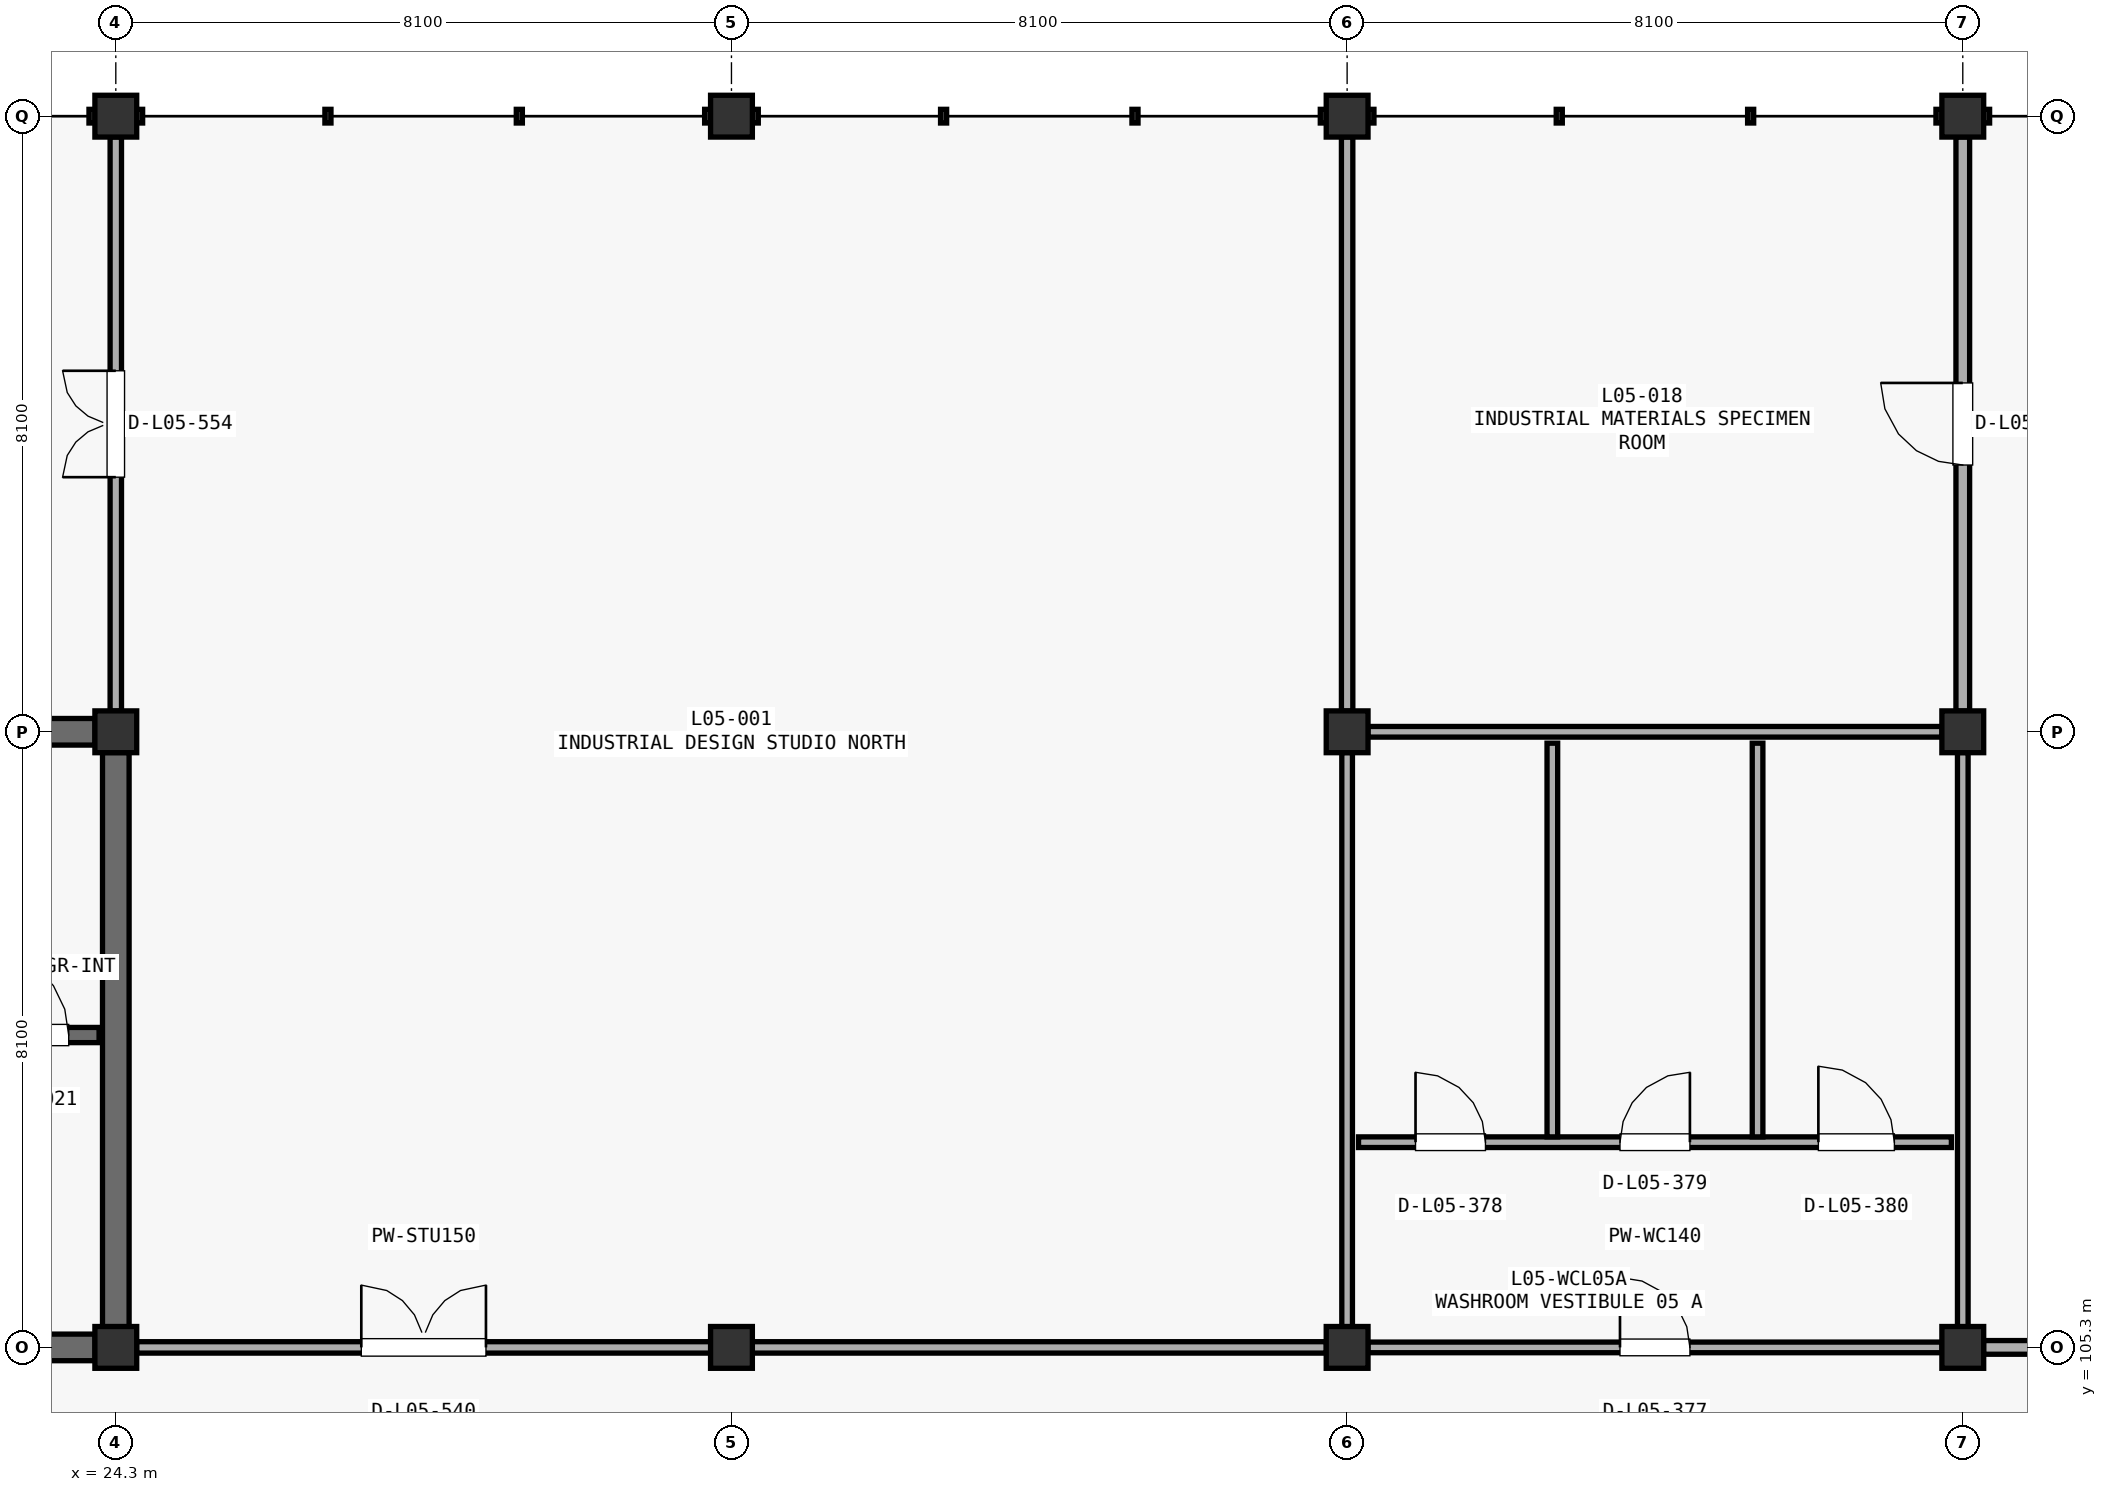
"""IFC4 building model, lengths in metres.
Left out: names, types, materials, properties, quantities, classifications, styles, units other than length and angle.
Written with IfcOpenShell. Run it as: python <this file> out.ifc"""

import sys

from ifc_helpers import new_model, si_unit, direction, frame, frame_2d, origin, origin_2d, place, context, subcontext, project, spatial, rectangle, extrude, element, fill, save


model = new_model("IFC4")
c1 = context("Model", 3, precision=1e-05, world=origin(), true_north=direction((0.0, 1.0)))
c2 = subcontext(c1, "Body", "Model", "MODEL_VIEW")
j1 = project(units=[si_unit("LENGTHUNIT", "METRE"), si_unit("PLANEANGLEUNIT", "RADIAN")], contexts=[c1])
p1 = place(None, origin())
s1 = spatial("IfcSite", under=j1, at=p1, CompositionType="ELEMENT")
p2 = place(p1, origin())
s2 = spatial("IfcBuilding", under=s1, at=p2, CompositionType="ELEMENT")
p3 = place(p2, frame((0.0, 0.0, 22.95)))
s3 = spatial("IfcBuildingStorey", under=s2, at=p3, CompositionType="ELEMENT", Elevation=22.95)
for number, where, z_axis, x_axis in (
    (1, (24.3, 105.3, 0.0), (0.0, 0.0, 1.0), (1.0, 0.0, 0.0)),
    (2, (24.3, 113.4, 0.0), (0.0, 0.0, 1.0), (1.0, 0.0, 0.0)),
    (3, (24.3, 121.5, 0.0), (0.0, 0.0, 1.0), (1.0, 0.0, 0.0)),
    (4, (32.4, 105.3, 0.0), (0.0, 0.0, 1.0), (1.0, 0.0, 0.0)),
    (5, (32.4, 113.4, 0.0), (0.0, 0.0, 1.0), (1.0, 0.0, 0.0)),
    (6, (32.4, 121.5, 0.0), (0.0, 0.0, 1.0), (1.0, 0.0, 0.0)),
    (7, (40.5, 105.3, 0.0), (0.0, 0.0, 1.0), (1.0, 0.0, 0.0)),
    (8, (40.5, 113.4, 0.0), (0.0, 0.0, 1.0), (1.0, 0.0, 0.0)),
    (9, (40.5, 121.5, 0.0), (0.0, 0.0, 1.0), (1.0, 0.0, 0.0)),
    (10, (48.6, 105.3, 0.0), (0.0, 0.0, 1.0), (1.0, 0.0, 0.0)),
    (11, (48.6, 113.4, 0.0), (0.0, 0.0, 1.0), (1.0, 0.0, 0.0)),
    (12, (48.6, 121.5, 0.0), (0.0, 0.0, 1.0), (1.0, 0.0, 0.0)),
):
    element("IfcColumn", number, at=place(p3, frame(where, z_axis=z_axis, x_axis=x_axis)), inside=s3, PredefinedType="COLUMN", context=c2, shape_type="SweptSolid", body=[
        extrude(rectangle(XDim=0.55, YDim=0.55, at=origin_2d()), origin(), (0.0, 0.0, 1.0), 4.42),
    ])
p4 = place(p3, frame((16.473, 113.4, 0.0), z_axis=(0.0, 0.0, 1.0), x_axis=(1.0, 0.0, 0.0)))
e13 = element("IfcWall", 13, at=p4, inside=s3, PredefinedType="SHEAR", context=c2, shape_type="SweptSolid", body=[
    extrude(rectangle(XDim=7.554, YDim=0.35, at=frame_2d((3.777, 0.0))), origin(), (0.0, 0.0, 1.0), 4.162),
])
p5 = place(p3, frame((24.3, 105.573, 0.0), z_axis=(0.0, 0.0, 1.0), x_axis=(0.0, 1.0, 0.0)))
e14 = element("IfcWall", 14, at=p5, inside=s3, PredefinedType="SHEAR", context=c2, shape_type="SweptSolid", body=[
    extrude(rectangle(XDim=7.554, YDim=0.35, at=frame_2d((3.777, 0.0))), origin(), (0.0, 0.0, 1.0), 4.162),
])
p6 = place(p3, frame((16.473, 105.3, 0.0), z_axis=(0.0, 0.0, 1.0), x_axis=(1.0, 0.0, 0.0)))
e15 = element("IfcWall", 15, at=p6, inside=s3, PredefinedType="SHEAR", context=c2, shape_type="SweptSolid", body=[
    extrude(rectangle(XDim=7.554, YDim=0.35, at=frame_2d((3.777, 0.0))), origin(), (0.0, 0.0, 1.0), 4.162),
])
p7 = place(p6, frame((5.304, 0.0, 0.0)))
e16 = element("IfcOpeningElement", 16, at=p7, cuts=e15, PredefinedType="OPENING", context=c2, shape_type="SweptSolid", body=[
    extrude(rectangle(XDim=1.2, YDim=2.2, at=frame_2d((0.6, 1.1))), frame((0.0, 0.185, 0.0), z_axis=(0.0, -1.0, 0.0), x_axis=(1.0, 0.0, 0.0)), (0.0, 0.0, 1.0), 0.37),
])
p8 = place(p3, frame((16.42, 109.41, 0.0), z_axis=(0.0, 0.0, 1.0), x_axis=(1.0, 0.0, 0.0)))
e17 = element("IfcWall", 17, at=p8, inside=s3, PredefinedType="SHEAR", context=c2, shape_type="SweptSolid", body=[
    extrude(rectangle(XDim=7.66, YDim=0.2, at=frame_2d((3.83, 0.0))), origin(), (0.0, 0.0, 1.0), 4.162),
])
p9 = place(p8, frame((6.11, 0.0, 0.0)))
e18 = element("IfcOpeningElement", 18, at=p9, cuts=e17, PredefinedType="OPENING", context=c2, shape_type="SweptSolid", body=[
    extrude(rectangle(XDim=1.15, YDim=2.2, at=frame_2d((0.575, 1.1))), frame((0.0, 0.11, 0.0), z_axis=(0.0, -1.0, 0.0), x_axis=(1.0, 0.0, 0.0)), (0.0, 0.0, 1.0), 0.22),
])
p10 = place(p3, frame((40.773, 105.3, 0.0), z_axis=(0.0, 0.0, 1.0), x_axis=(1.0, 0.0, 0.0)))
e19 = element("IfcWall", 19, at=p10, inside=s3, PredefinedType="PARTITIONING", context=c2, shape_type="SweptSolid", body=[
    extrude(rectangle(XDim=7.554, YDim=0.14, at=frame_2d((3.777, 0.0))), origin(), (0.0, 0.0, 1.0), 3.21),
])
p11 = place(p10, frame((3.317, 0.0, 0.0)))
e20 = element("IfcOpeningElement", 20, at=p11, cuts=e19, PredefinedType="OPENING", context=c2, shape_type="SweptSolid", body=[
    extrude(rectangle(XDim=0.92, YDim=2.15, at=frame_2d((0.46, 1.075))), frame((0.0, 0.08, 0.0), z_axis=(0.0, -1.0, 0.0), x_axis=(1.0, 0.0, 0.0)), (0.0, 0.0, 1.0), 0.16),
])
p12 = place(p3, frame((40.773, 113.4, 0.0), z_axis=(0.0, 0.0, 1.0), x_axis=(1.0, 0.0, 0.0)))
e21 = element("IfcWall", 21, at=p12, inside=s3, PredefinedType="PARTITIONING", context=c2, shape_type="SweptSolid", body=[
    extrude(rectangle(XDim=7.554, YDim=0.14, at=frame_2d((3.777, 0.0))), origin(), (0.0, 0.0, 1.0), 3.41),
])
p13 = place(p3, frame((40.5, 105.573, 0.0), z_axis=(0.0, 0.0, 1.0), x_axis=(0.0, 1.0, 0.0)))
e22 = element("IfcWall", 22, at=p13, inside=s3, PredefinedType="PARTITIONING", context=c2, shape_type="SweptSolid", body=[
    extrude(rectangle(XDim=7.554, YDim=0.14, at=frame_2d((3.777, 0.0))), origin(), (0.0, 0.0, 1.0), 3.21),
])
p14 = place(p3, frame((48.6, 105.573, 0.0), z_axis=(0.0, 0.0, 1.0), x_axis=(0.0, 1.0, 0.0)))
e23 = element("IfcWall", 23, at=p14, inside=s3, PredefinedType="PARTITIONING", context=c2, shape_type="SweptSolid", body=[
    extrude(rectangle(XDim=7.554, YDim=0.14, at=frame_2d((3.777, 0.0))), origin(), (0.0, 0.0, 1.0), 3.51),
])
p15 = place(p3, frame((40.65, 108.0, 0.0), z_axis=(0.0, 0.0, 1.0), x_axis=(1.0, 0.0, 0.0)))
e24 = element("IfcWall", 24, at=p15, inside=s3, PredefinedType="PARTITIONING", context=c2, shape_type="SweptSolid", body=[
    extrude(rectangle(XDim=7.8, YDim=0.14, at=frame_2d((3.9, 0.0))), origin(), (0.0, 0.0, 1.0), 4.162),
])
p16 = place(p15, frame((0.75, 0.0, 0.0)))
e25 = element("IfcOpeningElement", 25, at=p16, cuts=e24, PredefinedType="OPENING", context=c2, shape_type="SweptSolid", body=[
    extrude(rectangle(XDim=0.92, YDim=2.15, at=frame_2d((0.46, 1.075))), frame((0.0, 0.08, 0.0), z_axis=(0.0, -1.0, 0.0), x_axis=(1.0, 0.0, 0.0)), (0.0, 0.0, 1.0), 0.16),
])
p17 = place(p15, frame((3.44, 0.0, 0.0)))
e26 = element("IfcOpeningElement", 26, at=p17, cuts=e24, PredefinedType="OPENING", context=c2, shape_type="SweptSolid", body=[
    extrude(rectangle(XDim=0.92, YDim=2.15, at=frame_2d((0.46, 1.075))), frame((0.0, 0.08, 0.0), z_axis=(0.0, -1.0, 0.0), x_axis=(1.0, 0.0, 0.0)), (0.0, 0.0, 1.0), 0.16),
])
p18 = place(p15, frame((6.05, 0.0, 0.0)))
e27 = element("IfcOpeningElement", 27, at=p18, cuts=e24, PredefinedType="OPENING", context=c2, shape_type="SweptSolid", body=[
    extrude(rectangle(XDim=1.0, YDim=2.15, at=frame_2d((0.5, 1.075))), frame((0.0, 0.08, 0.0), z_axis=(0.0, -1.0, 0.0), x_axis=(1.0, 0.0, 0.0)), (0.0, 0.0, 1.0), 0.16),
])
for number, where, z_axis, x_axis in (
    (28, (43.2, 108.07, 0.0), (0.0, 0.0, 1.0), (0.0, 1.0, 0.0)),
    (29, (45.9, 108.07, 0.0), (0.0, 0.0, 1.0), (0.0, 1.0, 0.0)),
):
    element("IfcWall", number, at=place(p3, frame(where, z_axis=z_axis, x_axis=x_axis)), inside=s3, PredefinedType="PARTITIONING", context=c2, shape_type="SweptSolid", body=[
        extrude(rectangle(XDim=5.18, YDim=0.14, at=frame_2d((2.59, 0.0))), origin(), (0.0, 0.0, 1.0), 4.162),
    ])
p19 = place(p3, frame((24.573, 105.3, 0.0), z_axis=(0.0, 0.0, 1.0), x_axis=(1.0, 0.0, 0.0)))
e30 = element("IfcWall", 30, at=p19, inside=s3, PredefinedType="PARTITIONING", context=c2, shape_type="SweptSolid", body=[
    extrude(rectangle(XDim=7.554, YDim=0.15, at=frame_2d((3.777, 0.0))), origin(), (0.0, 0.0, 1.0), 3.562),
])
p20 = place(p19, frame((2.957, 0.0, 0.0)))
e31 = element("IfcOpeningElement", 31, at=p20, cuts=e30, PredefinedType="OPENING", context=c2, shape_type="SweptSolid", body=[
    extrude(rectangle(XDim=1.64, YDim=2.25, at=frame_2d((0.82, 1.125))), frame((0.0, 0.085, 0.0), z_axis=(0.0, -1.0, 0.0), x_axis=(1.0, 0.0, 0.0)), (0.0, 0.0, 1.0), 0.17),
])
p21 = place(p3, frame((32.673, 105.3, 0.0), z_axis=(0.0, 0.0, 1.0), x_axis=(1.0, 0.0, 0.0)))
e32 = element("IfcWall", 32, at=p21, inside=s3, PredefinedType="PARTITIONING", context=c2, shape_type="SweptSolid", body=[
    extrude(rectangle(XDim=7.554, YDim=0.15, at=frame_2d((3.777, 0.0))), origin(), (0.0, 0.0, 1.0), 3.312),
])
p22 = place(p3, frame((40.5, 113.673, 0.0), z_axis=(0.0, 0.0, 1.0), x_axis=(0.0, 1.0, 0.0)))
e33 = element("IfcWall", 33, at=p22, inside=s3, PredefinedType="PARTITIONING", context=c2, shape_type="SweptSolid", body=[
    extrude(rectangle(XDim=7.554, YDim=0.15, at=frame_2d((3.777, 0.0))), origin(), (0.0, 0.0, 1.0), 3.412),
])
p23 = place(p3, frame((24.3, 113.673, 0.0), z_axis=(0.0, 0.0, 1.0), x_axis=(0.0, 1.0, 0.0)))
e34 = element("IfcWall", 34, at=p23, inside=s3, PredefinedType="PARTITIONING", context=c2, shape_type="SweptSolid", body=[
    extrude(rectangle(XDim=7.554, YDim=0.15, at=frame_2d((3.777, 0.0))), origin(), (0.0, 0.0, 1.0), 3.512),
])
p24 = place(p23, frame((3.077, 0.0, 0.0)))
e35 = element("IfcOpeningElement", 35, at=p24, cuts=e34, PredefinedType="OPENING", context=c2, shape_type="SweptSolid", body=[
    extrude(rectangle(XDim=1.4, YDim=2.2, at=frame_2d((0.7, 1.1))), frame((0.0, 0.085, 0.0), z_axis=(0.0, -1.0, 0.0), x_axis=(1.0, 0.0, 0.0)), (0.0, 0.0, 1.0), 0.17),
])
p25 = place(p3, frame((48.873, 105.3, 0.0), z_axis=(0.0, 0.0, 1.0), x_axis=(1.0, 0.0, 0.0)))
e36 = element("IfcWall", 36, at=p25, inside=s3, PredefinedType="PARTITIONING", context=c2, shape_type="SweptSolid", body=[
    extrude(rectangle(XDim=7.554, YDim=0.18, at=frame_2d((3.777, 0.0))), origin(), (0.0, 0.0, 1.0), 3.412),
])
p26 = place(p25, frame((3.237, 0.0, 0.0)))
e37 = element("IfcOpeningElement", 37, at=p26, cuts=e36, PredefinedType="OPENING", context=c2, shape_type="SweptSolid", body=[
    extrude(rectangle(XDim=1.08, YDim=2.15, at=frame_2d((0.54, 1.075))), frame((0.0, 0.1, 0.0), z_axis=(0.0, -1.0, 0.0), x_axis=(1.0, 0.0, 0.0)), (0.0, 0.0, 1.0), 0.2),
])
p27 = place(p3, frame((48.6, 113.673, 0.0), z_axis=(0.0, 0.0, 1.0), x_axis=(0.0, 1.0, 0.0)))
e38 = element("IfcWall", 38, at=p27, inside=s3, PredefinedType="PARTITIONING", context=c2, shape_type="SweptSolid", body=[
    extrude(rectangle(XDim=7.554, YDim=0.18, at=frame_2d((3.777, 0.0))), origin(), (0.0, 0.0, 1.0), 3.562),
])
p28 = place(p27, frame((3.237, 0.0, 0.0)))
e39 = element("IfcOpeningElement", 39, at=p28, cuts=e38, PredefinedType="OPENING", context=c2, shape_type="SweptSolid", body=[
    extrude(rectangle(XDim=1.08, YDim=2.15, at=frame_2d((0.54, 1.075))), frame((0.0, 0.1, 0.0), z_axis=(0.0, -1.0, 0.0), x_axis=(1.0, 0.0, 0.0)), (0.0, 0.0, 1.0), 0.2),
])
p29 = place(p9, origin())
e40 = element("IfcDoor", 40, at=p29, inside=s3, OperationType="SINGLE_SWING_LEFT", PredefinedType="DOOR", context=c2, shape_type="SweptSolid", body=[
    extrude(rectangle(XDim=1.15, YDim=2.2, at=frame_2d((0.575, 1.1))), frame((0.0, 0.025, 0.0), z_axis=(0.0, -1.0, 0.0), x_axis=(1.0, 0.0, 0.0)), (0.0, 0.0, 1.0), 0.05),
])
fill(e18, e40)
p30 = place(p11, origin())
e41 = element("IfcDoor", 41, at=p30, inside=s3, OperationType="SINGLE_SWING_LEFT", PredefinedType="DOOR", context=c2, shape_type="SweptSolid", body=[
    extrude(rectangle(XDim=0.92, YDim=2.15, at=frame_2d((0.46, 1.075))), frame((0.0, 0.025, 0.0), z_axis=(0.0, -1.0, 0.0), x_axis=(1.0, 0.0, 0.0)), (0.0, 0.0, 1.0), 0.05),
])
fill(e20, e41)
p31 = place(p16, origin())
e42 = element("IfcDoor", 42, at=p31, inside=s3, OperationType="SINGLE_SWING_LEFT", PredefinedType="DOOR", context=c2, shape_type="SweptSolid", body=[
    extrude(rectangle(XDim=0.92, YDim=2.15, at=frame_2d((0.46, 1.075))), frame((0.0, 0.025, 0.0), z_axis=(0.0, -1.0, 0.0), x_axis=(1.0, 0.0, 0.0)), (0.0, 0.0, 1.0), 0.05),
])
fill(e25, e42)
p32 = place(p17, origin())
e43 = element("IfcDoor", 43, at=p32, inside=s3, OperationType="SINGLE_SWING_RIGHT", PredefinedType="DOOR", context=c2, shape_type="SweptSolid", body=[
    extrude(rectangle(XDim=0.92, YDim=2.15, at=frame_2d((0.46, 1.075))), frame((0.0, 0.025, 0.0), z_axis=(0.0, -1.0, 0.0), x_axis=(1.0, 0.0, 0.0)), (0.0, 0.0, 1.0), 0.05),
])
fill(e26, e43)
p33 = place(p18, origin())
e44 = element("IfcDoor", 44, at=p33, inside=s3, OperationType="SINGLE_SWING_LEFT", PredefinedType="DOOR", context=c2, shape_type="SweptSolid", body=[
    extrude(rectangle(XDim=1.0, YDim=2.15, at=frame_2d((0.5, 1.075))), frame((0.0, 0.025, 0.0), z_axis=(0.0, -1.0, 0.0), x_axis=(1.0, 0.0, 0.0)), (0.0, 0.0, 1.0), 0.05),
])
fill(e27, e44)
p34 = place(p20, origin())
e45 = element("IfcDoor", 45, at=p34, inside=s3, OperationType="DOUBLE_SWING_LEFT", PredefinedType="DOOR", context=c2, shape_type="SweptSolid", body=[
    extrude(rectangle(XDim=1.64, YDim=2.25, at=frame_2d((0.82, 1.125))), frame((0.0, 0.025, 0.0), z_axis=(0.0, -1.0, 0.0), x_axis=(1.0, 0.0, 0.0)), (0.0, 0.0, 1.0), 0.05),
])
fill(e31, e45)
p35 = place(p24, origin())
e46 = element("IfcDoor", 46, at=p35, inside=s3, OperationType="DOUBLE_SWING_LEFT", PredefinedType="DOOR", context=c2, shape_type="SweptSolid", body=[
    extrude(rectangle(XDim=1.4, YDim=2.2, at=frame_2d((0.7, 1.1))), frame((0.0, 0.025, 0.0), z_axis=(0.0, -1.0, 0.0), x_axis=(1.0, 0.0, 0.0)), (0.0, 0.0, 1.0), 0.05),
])
fill(e35, e46)
p36 = place(p28, origin())
e47 = element("IfcDoor", 47, at=p36, inside=s3, OperationType="SINGLE_SWING_RIGHT", PredefinedType="DOOR", context=c2, shape_type="SweptSolid", body=[
    extrude(rectangle(XDim=1.08, YDim=2.15, at=frame_2d((0.54, 1.075))), frame((0.0, 0.025, 0.0), z_axis=(0.0, -1.0, 0.0), x_axis=(1.0, 0.0, 0.0)), (0.0, 0.0, 1.0), 0.05),
])
fill(e39, e47)
save(model, sys.argv[1])
